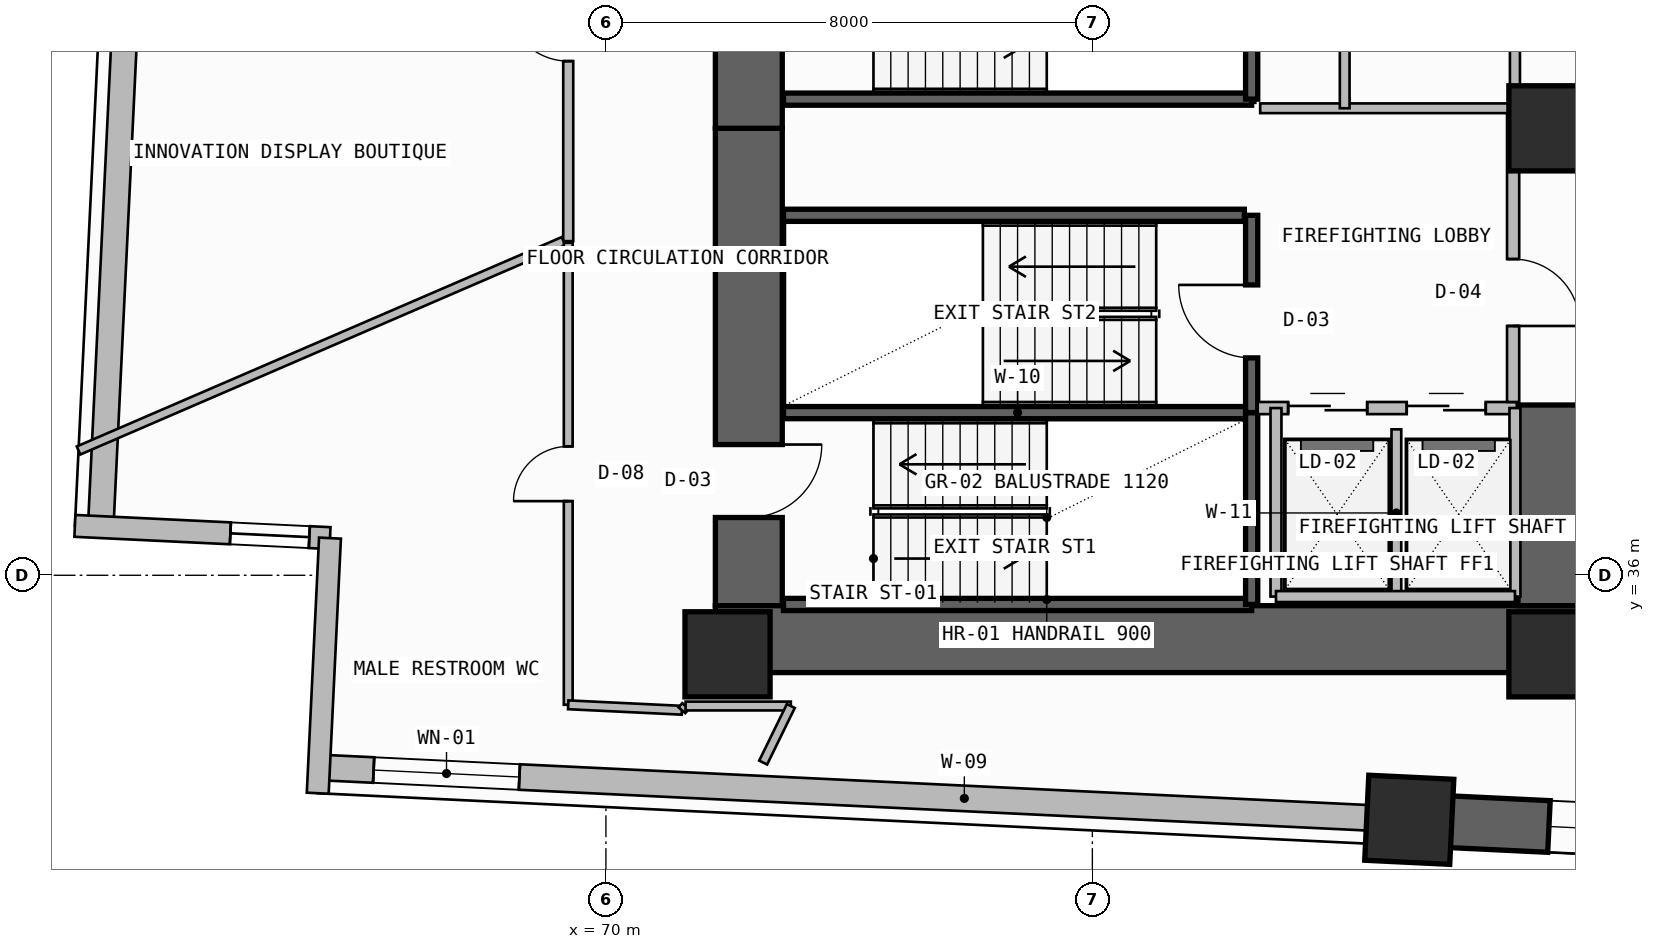
"""IFC4 building model, lengths in metres.
Left out: names, types, materials, properties, quantities, classifications, styles, units other than length and angle.
Written with IfcOpenShell. Run it as: python <this file> out.ifc"""

import sys

from ifc_helpers import new_model, si_unit, direction, frame, frame_2d, origin, origin_2d, place, context, subcontext, project, spatial, rectangle, extrude, element, fill, save


model = new_model("IFC4")
c1 = context("Model", 3, precision=1e-05, world=origin(), true_north=direction((0.0, 1.0)))
c2 = subcontext(c1, "Body", "Model", "MODEL_VIEW")
j1 = project(units=[si_unit("LENGTHUNIT", "METRE"), si_unit("PLANEANGLEUNIT", "RADIAN")], contexts=[c1])
p1 = place(None, origin())
s1 = spatial("IfcSite", under=j1, at=p1, CompositionType="ELEMENT")
p2 = place(p1, origin())
s2 = spatial("IfcBuilding", under=s1, at=p2, CompositionType="ELEMENT")
p3 = place(p2, frame((0.0, 0.0, 41.1)))
s3 = spatial("IfcBuildingStorey", under=s2, at=p3, CompositionType="ELEMENT", Elevation=41.1)
p4 = place(p3, frame((72.35, 35.5, -0.2), z_axis=(0.0, 0.0, 1.0), x_axis=(0.0, 1.0, 0.0)))
e1 = element("IfcWall", 1, at=p4, inside=s3, PredefinedType="SHEAR", context=c2, shape_type="SweptSolid", body=[
    extrude(rectangle(XDim=7.85, YDim=1.1, at=frame_2d((3.925, 0.0))), origin(), (0.0, 0.0, 1.0), 3.6),
])
p5 = place(p4, frame((1.45, 0.0, 0.2)))
e2 = element("IfcOpeningElement", 2, at=p5, cuts=e1, PredefinedType="OPENING", context=c2, shape_type="SweptSolid", body=[
    extrude(rectangle(XDim=1.2, YDim=2.2, at=frame_2d((0.6, 1.1))), frame((0.0, 0.56, 0.0), z_axis=(0.0, -1.0, 0.0), x_axis=(1.0, 0.0, 0.0)), (0.0, 0.0, 1.0), 1.12),
])
p6 = place(p3, frame((71.8, 34.95, -0.2), z_axis=(0.0, 0.0, 1.0), x_axis=(1.0, 0.0, 0.0)))
e3 = element("IfcWall", 3, at=p6, inside=s3, PredefinedType="SHEAR", context=c2, shape_type="SweptSolid", body=[
    extrude(rectangle(XDim=14.3, YDim=1.1, at=frame_2d((7.15, 0.0))), origin(), (0.0, 0.0, 1.0), 3.6),
])
p7 = place(p3, frame((85.55, 35.5, -0.2), z_axis=(0.0, 0.0, 1.0), x_axis=(0.0, 1.0, 0.0)))
e4 = element("IfcWall", 4, at=p7, inside=s3, PredefinedType="SHEAR", context=c2, shape_type="SweptSolid", body=[
    extrude(rectangle(XDim=3.3, YDim=1.1, at=frame_2d((1.65, 0.0))), origin(), (0.0, 0.0, 1.0), 3.6),
])
p8 = place(p3, frame((72.35, 43.35, -0.2), z_axis=(0.0, 0.0, 1.0), x_axis=(0.0, 1.0, 0.0)))
e5 = element("IfcWall", 5, at=p8, inside=s3, PredefinedType="SHEAR", context=c2, shape_type="SweptSolid", body=[
    extrude(rectangle(XDim=12.7, YDim=1.1, at=frame_2d((6.35, 0.0))), origin(), (0.0, 0.0, 1.0), 3.6),
])
p9 = place(p8, frame((1.35, 0.0, 0.2)))
e6 = element("IfcOpeningElement", 6, at=p9, cuts=e5, PredefinedType="OPENING", context=c2, shape_type="SweptSolid", body=[
    extrude(rectangle(XDim=1.2, YDim=2.2, at=frame_2d((0.6, 1.1))), frame((0.0, 0.56, 0.0), z_axis=(0.0, -1.0, 0.0), x_axis=(1.0, 0.0, 0.0)), (0.0, 0.0, 1.0), 1.12),
])
for number, where, z_axis, x_axis in (
    (7, (72.0, 34.7, 0.0), (0.0, 0.0, 1.0), (1.0, 0.0, 0.0)),
    (8, (85.55, 34.7, 0.0), (0.0, 0.0, 1.0), (1.0, 0.0, 0.0)),
    (9, (85.55, 43.35, 0.0), (0.0, 0.0, 1.0), (1.0, 0.0, 0.0)),
    (10, (83.212, 31.979, 0.0), (0.0, 0.0, 1.0), (-0.999, 0.048, 0.0)),
):
    element("IfcColumn", number, at=place(p3, frame(where, z_axis=z_axis, x_axis=x_axis)), inside=s3, PredefinedType="COLUMN", context=c2, shape_type="SweptSolid", body=[
        extrude(rectangle(XDim=1.4, YDim=1.4, at=origin_2d()), origin(), (0.0, 0.0, 1.0), 3.6),
    ])
p10 = place(p3, frame((65.281, 32.841, 0.0), z_axis=(0.0, 0.0, 1.0), x_axis=(0.998848298084, -0.047979968897, 0.0)))
e11 = element("IfcWall", 11, at=p10, inside=s3, PredefinedType="SOLIDWALL", context=c2, shape_type="SweptSolid", body=[
    extrude(rectangle(XDim=17.952, YDim=0.42, at=frame_2d((8.976, 0.0))), origin(), (0.0, 0.0, 1.0), 2.385),
])
p11 = place(p10, frame((0.9, 0.0, 1.2)))
e12 = element("IfcOpeningElement", 12, at=p11, cuts=e11, PredefinedType="OPENING", context=c2, shape_type="SweptSolid", body=[
    extrude(rectangle(XDim=2.4, YDim=0.9, at=frame_2d((1.2, 0.45))), frame((0.0, 0.22, 0.0), z_axis=(0.0, -1.0, 0.0), x_axis=(1.0, 0.0, 0.0)), (0.0, 0.0, 1.0), 0.44),
])
p12 = place(p3, frame((83.212, 31.979, -0.2), z_axis=(0.0, 0.0, 1.0), x_axis=(0.998848235141, -0.047981279227, 0.0)))
e13 = element("IfcWall", 13, at=p12, inside=s3, PredefinedType="SHEAR", context=c2, shape_type="SweptSolid", body=[
    extrude(rectangle(XDim=27.456, YDim=0.85, at=frame_2d((13.728, 0.0))), origin(), (0.0, 0.0, 1.0), 3.6),
])
p13 = place(p12, frame((2.3, 0.0, 1.2)))
e14 = element("IfcOpeningElement", 14, at=p13, cuts=e13, PredefinedType="OPENING", context=c2, shape_type="SweptSolid", body=[
    extrude(rectangle(XDim=2.4, YDim=0.9, at=frame_2d((1.2, 0.45))), frame((0.0, 0.435, 0.0), z_axis=(0.0, -1.0, 0.0), x_axis=(1.0, 0.0, 0.0)), (0.0, 0.0, 1.0), 0.87),
])
p14 = place(p3, frame((62.378, 51.09, 0.0), z_axis=(0.0, 0.0, 1.0), x_axis=(-0.047978424452, -0.99884837227, 0.0)))
e15 = element("IfcWall", 15, at=p14, inside=s3, PredefinedType="SOLIDWALL", context=c2, shape_type="SweptSolid", body=[
    extrude(rectangle(XDim=14.314, YDim=0.42, at=frame_2d((7.157, 0.0))), origin(), (0.0, 0.0, 1.0), 2.385),
])
p15 = place(p14, frame((2.3, 0.0, 1.2)))
e16 = element("IfcOpeningElement", 16, at=p15, cuts=e15, PredefinedType="OPENING", context=c2, shape_type="SweptSolid", body=[
    extrude(rectangle(XDim=2.4, YDim=0.9, at=frame_2d((1.2, 0.45))), frame((0.0, 0.22, 0.0), z_axis=(0.0, -1.0, 0.0), x_axis=(1.0, 0.0, 0.0)), (0.0, 0.0, 1.0), 0.44),
])
p16 = place(p3, frame((61.267, 36.812, 0.0), z_axis=(0.0, 0.0, 1.0), x_axis=(0.998849519138, -0.047954542207, 0.0)))
e17 = element("IfcWall", 17, at=p16, inside=s3, PredefinedType="SOLIDWALL", context=c2, shape_type="SweptSolid", body=[
    extrude(rectangle(XDim=4.2, YDim=0.36, at=frame_2d((2.1, 0.0))), origin(), (0.0, 0.0, 1.0), 3.4),
])
p17 = place(p16, frame((2.56, 0.0, 0.45)))
e18 = element("IfcOpeningElement", 18, at=p17, cuts=e17, PredefinedType="OPENING", context=c2, shape_type="SweptSolid", body=[
    extrude(rectangle(XDim=1.3, YDim=2.4, at=frame_2d((0.65, 1.2))), frame((0.0, 0.19, 0.0), z_axis=(0.0, -1.0, 0.0), x_axis=(1.0, 0.0, 0.0)), (0.0, 0.0, 1.0), 0.38),
])
p18 = place(p3, frame((65.462, 36.611, 0.0), z_axis=(0.0, 0.0, 1.0), x_axis=(-0.048015322758, -0.998846599224, 0.0)))
e19 = element("IfcWall", 19, at=p18, inside=s3, PredefinedType="SOLIDWALL", context=c2, shape_type="SweptSolid", body=[
    extrude(rectangle(XDim=4.2, YDim=0.36, at=frame_2d((2.1, 0.0))), origin(), (0.0, 0.0, 1.0), 3.4),
])
for number, where, z_axis, x_axis in (
    (20, (72.92, 35.52, -0.2), (0.0, 0.0, 1.0), (1.0, 0.0, 0.0)),
    (21, (72.92, 38.675, -0.2), (0.0, 0.0, 1.0), (1.0, 0.0, 0.0)),
):
    element("IfcWall", number, at=place(p3, frame(where, z_axis=z_axis, x_axis=x_axis)), inside=s3, PredefinedType="SOLIDWALL", context=c2, shape_type="SweptSolid", body=[
        extrude(rectangle(XDim=7.7, YDim=0.2, at=frame_2d((3.85, 0.0))), origin(), (0.0, 0.0, 1.0), 3.6),
    ])
p19 = place(p3, frame((80.62, 35.52, -0.2), z_axis=(0.0, 0.0, 1.0), x_axis=(0.0, 1.0, 0.0)))
e22 = element("IfcWall", 22, at=p19, inside=s3, PredefinedType="SOLIDWALL", context=c2, shape_type="SweptSolid", body=[
    extrude(rectangle(XDim=3.155, YDim=0.2, at=frame_2d((1.578, 0.0))), origin(), (0.0, 0.0, 1.0), 3.6),
])
p20 = place(p3, frame((80.62, 38.675, -0.2), z_axis=(0.0, 0.0, 1.0), x_axis=(0.0, 1.0, 0.0)))
e23 = element("IfcWall", 23, at=p20, inside=s3, PredefinedType="SOLIDWALL", context=c2, shape_type="SweptSolid", body=[
    extrude(rectangle(XDim=3.245, YDim=0.2, at=frame_2d((1.623, 0.0))), origin(), (0.0, 0.0, 1.0), 3.6),
])
p21 = place(p20, frame((0.9, 0.0, 0.2)))
e24 = element("IfcOpeningElement", 24, at=p21, cuts=e23, PredefinedType="OPENING", context=c2, shape_type="SweptSolid", body=[
    extrude(rectangle(XDim=1.2, YDim=2.2, at=frame_2d((0.6, 1.1))), frame((0.0, 0.11, 0.0), z_axis=(0.0, -1.0, 0.0), x_axis=(1.0, 0.0, 0.0)), (0.0, 0.0, 1.0), 0.22),
])
p22 = place(p3, frame((80.72, 38.75, 0.0), z_axis=(0.0, 0.0, 1.0), x_axis=(1.0, 0.0, 0.0)))
e25 = element("IfcWall", 25, at=p22, inside=s3, PredefinedType="SOLIDWALL", context=c2, shape_type="SweptSolid", body=[
    extrude(rectangle(XDim=4.26, YDim=0.2, at=frame_2d((2.13, 0.0))), origin(), (0.0, 0.0, 1.0), 3.4),
])
p23 = place(p22, frame((0.5, 0.0, 0.0)))
e26 = element("IfcOpeningElement", 26, at=p23, cuts=e25, PredefinedType="OPENING", context=c2, shape_type="SweptSolid", body=[
    extrude(rectangle(XDim=1.3, YDim=2.3, at=frame_2d((0.65, 1.15))), frame((0.0, 0.11, 0.0), z_axis=(0.0, -1.0, 0.0), x_axis=(1.0, 0.0, 0.0)), (0.0, 0.0, 1.0), 0.22),
])
p24 = place(p22, frame((2.45, 0.0, 0.0)))
e27 = element("IfcOpeningElement", 27, at=p24, cuts=e25, PredefinedType="OPENING", context=c2, shape_type="SweptSolid", body=[
    extrude(rectangle(XDim=1.3, YDim=2.3, at=frame_2d((0.65, 1.15))), frame((0.0, 0.11, 0.0), z_axis=(0.0, -1.0, 0.0), x_axis=(1.0, 0.0, 0.0)), (0.0, 0.0, 1.0), 0.22),
])
p25 = place(p3, frame((83.0, 35.65, 0.0), z_axis=(0.0, 0.0, 1.0), x_axis=(0.0, 1.0, 0.0)))
e28 = element("IfcWall", 28, at=p25, inside=s3, PredefinedType="PLUMBINGWALL", context=c2, shape_type="SweptSolid", body=[
    extrude(rectangle(XDim=2.75, YDim=0.16, at=frame_2d((1.375, 0.0))), origin(), (0.0, 0.0, 1.0), 3.4),
])
for number, where, z_axis, x_axis in (
    (29, (84.95, 35.65, 0.0), (0.0, 0.0, 1.0), (0.0, 1.0, 0.0)),
    (30, (81.02, 35.65, 0.0), (0.0, 0.0, 1.0), (0.0, 1.0, 0.0)),
):
    element("IfcWall", number, at=place(p3, frame(where, z_axis=z_axis, x_axis=x_axis)), inside=s3, PredefinedType="SOLIDWALL", context=c2, shape_type="SweptSolid", body=[
        extrude(rectangle(XDim=3.1, YDim=0.18, at=frame_2d((1.55, 0.0))), origin(), (0.0, 0.0, 1.0), 3.4),
    ])
p26 = place(p3, frame((81.02, 35.65, 0.0), z_axis=(0.0, 0.0, 1.0), x_axis=(1.0, 0.0, 0.0)))
e31 = element("IfcWall", 31, at=p26, inside=s3, PredefinedType="SOLIDWALL", context=c2, shape_type="SweptSolid", body=[
    extrude(rectangle(XDim=3.93, YDim=0.18, at=frame_2d((1.965, 0.0))), origin(), (0.0, 0.0, 1.0), 3.4),
])
p27 = place(p3, frame((84.92, 38.85, 0.0), z_axis=(0.0, 0.0, 1.0), x_axis=(0.0, 1.0, 0.0)))
e32 = element("IfcWall", 32, at=p27, inside=s3, PredefinedType="SOLIDWALL", context=c2, shape_type="SweptSolid", body=[
    extrude(rectangle(XDim=4.83, YDim=0.2, at=frame_2d((2.415, 0.0))), origin(), (0.0, 0.0, 1.0), 3.4),
])
p28 = place(p27, frame((1.25, 0.0, 0.0)))
e33 = element("IfcOpeningElement", 33, at=p28, cuts=e32, PredefinedType="OPENING", context=c2, shape_type="SweptSolid", body=[
    extrude(rectangle(XDim=1.1, YDim=2.2, at=frame_2d((0.55, 1.1))), frame((0.0, 0.11, 0.0), z_axis=(0.0, -1.0, 0.0), x_axis=(1.0, 0.0, 0.0)), (0.0, 0.0, 1.0), 0.22),
])
p29 = place(p3, frame((72.92, 41.92, -0.2), z_axis=(0.0, 0.0, 1.0), x_axis=(1.0, 0.0, 0.0)))
e34 = element("IfcWall", 34, at=p29, inside=s3, PredefinedType="SOLIDWALL", context=c2, shape_type="SweptSolid", body=[
    extrude(rectangle(XDim=7.58, YDim=0.2, at=frame_2d((3.79, 0.0))), origin(), (0.0, 0.0, 1.0), 3.6),
])
p30 = place(p3, frame((72.92, 43.83, -0.2), z_axis=(0.0, 0.0, 1.0), x_axis=(1.0, 0.0, 0.0)))
e35 = element("IfcWall", 35, at=p30, inside=s3, PredefinedType="SOLIDWALL", context=c2, shape_type="SweptSolid", body=[
    extrude(rectangle(XDim=7.7, YDim=0.2, at=frame_2d((3.85, 0.0))), origin(), (0.0, 0.0, 1.0), 3.6),
])
p31 = place(p3, frame((80.62, 43.83, -0.2), z_axis=(0.0, 0.0, 1.0), x_axis=(0.0, 1.0, 0.0)))
e36 = element("IfcWall", 36, at=p31, inside=s3, PredefinedType="SOLIDWALL", context=c2, shape_type="SweptSolid", body=[
    extrude(rectangle(XDim=3.24, YDim=0.2, at=frame_2d((1.62, 0.0))), origin(), (0.0, 0.0, 1.0), 3.6),
])
p32 = place(p3, frame((84.95, 43.68, 0.0), z_axis=(0.0, 0.0, 1.0), x_axis=(0.0, 1.0, 0.0)))
e37 = element("IfcWall", 37, at=p32, inside=s3, PredefinedType="PLUMBINGWALL", context=c2, shape_type="SweptSolid", body=[
    extrude(rectangle(XDim=1.9, YDim=0.165, at=frame_2d((0.95, 0.0))), origin(), (0.0, 0.0, 1.0), 3.4),
])
p33 = place(p3, frame((80.76, 43.68, 0.0), z_axis=(0.0, 0.0, 1.0), x_axis=(1.0, 0.0, 0.0)))
e38 = element("IfcWall", 38, at=p33, inside=s3, PredefinedType="PLUMBINGWALL", context=c2, shape_type="SweptSolid", body=[
    extrude(rectangle(XDim=4.19, YDim=0.16, at=frame_2d((2.095, 0.0))), origin(), (0.0, 0.0, 1.0), 3.4),
])
p34 = place(p3, frame((82.15, 43.68, 0.0), z_axis=(0.0, 0.0, 1.0), x_axis=(0.0, 1.0, 0.0)))
e39 = element("IfcWall", 39, at=p34, inside=s3, PredefinedType="PLUMBINGWALL", context=c2, shape_type="SweptSolid", body=[
    extrude(rectangle(XDim=1.9, YDim=0.16, at=frame_2d((0.95, 0.0))), origin(), (0.0, 0.0, 1.0), 3.4),
])
p35 = place(p3, frame((69.38, 48.416, 0.0), z_axis=(0.0, 0.0, 1.0), x_axis=(0.0, -1.0, 0.0)))
e40 = element("IfcWall", 40, at=p35, inside=s3, PredefinedType="PARTITIONING", context=c2, shape_type="SweptSolid", body=[
    extrude(rectangle(XDim=6.921, YDim=0.165, at=frame_2d((3.46, 0.0))), origin(), (0.0, 0.0, 1.0), 3.4),
])
p36 = place(p35, frame((2.961, 0.0, 0.0)))
e41 = element("IfcOpeningElement", 41, at=p36, cuts=e40, PredefinedType="OPENING", context=c2, shape_type="SweptSolid", body=[
    extrude(rectangle(XDim=1.0, YDim=2.2, at=frame_2d((0.5, 1.1))), frame((0.0, 0.093, 0.0), z_axis=(0.0, -1.0, 0.0), x_axis=(1.0, 0.0, 0.0)), (0.0, 0.0, 1.0), 0.185),
])
p37 = place(p3, frame((69.302, 41.495, 0.0), z_axis=(0.0, 0.0, 1.0), x_axis=(-0.918109770602, -0.396326190309, 0.0)))
e42 = element("IfcWall", 42, at=p37, inside=s3, PredefinedType="PARTITIONING", context=c2, shape_type="SweptSolid", body=[
    extrude(rectangle(XDim=8.687, YDim=0.145, at=frame_2d((4.344, 0.0))), origin(), (0.0, 0.0, 1.0), 3.4),
])
p38 = place(p3, frame((69.38, 41.469, 0.0), z_axis=(0.0, 0.0, 1.0), x_axis=(0.0, -1.0, 0.0)))
e43 = element("IfcWall", 43, at=p38, inside=s3, PredefinedType="PARTITIONING", context=c2, shape_type="SweptSolid", body=[
    extrude(rectangle(XDim=7.599, YDim=0.145, at=frame_2d((3.799, 0.0))), origin(), (0.0, 0.0, 1.0), 3.4),
])
p39 = place(p38, frame((3.349, 0.0, 0.0)))
e44 = element("IfcOpeningElement", 44, at=p39, cuts=e43, PredefinedType="OPENING", context=c2, shape_type="SweptSolid", body=[
    extrude(rectangle(XDim=0.9, YDim=2.1, at=frame_2d((0.45, 1.05))), frame((0.0, 0.083, 0.0), z_axis=(0.0, -1.0, 0.0), x_axis=(1.0, 0.0, 0.0)), (0.0, 0.0, 1.0), 0.165),
])
p40 = place(p3, frame((69.38, 33.87, 0.0), z_axis=(0.0, 0.0, 1.0), x_axis=(0.998847987666, -0.047986430739, 0.0)))
e45 = element("IfcWall", 45, at=p40, inside=s3, PredefinedType="PARTITIONING", context=c2, shape_type="SweptSolid", body=[
    extrude(rectangle(XDim=1.872, YDim=0.145, at=frame_2d((0.936, 0.0))), origin(), (0.0, 0.0, 1.0), 3.4),
])
p41 = place(p3, frame((71.25, 33.78, 0.0), z_axis=(0.0, 0.0, 1.0), x_axis=(0.652100218984, 0.758132774916, 0.0)))
e46 = element("IfcWall", 46, at=p41, inside=s3, PredefinedType="PARTITIONING", context=c2, shape_type="SweptSolid", body=[
    extrude(rectangle(XDim=0.092, YDim=0.145, at=frame_2d((0.046, 0.0))), origin(), (0.0, 0.0, 1.0), 3.4),
])
p42 = place(p3, frame((71.31, 33.85, 0.0), z_axis=(0.0, 0.0, 1.0), x_axis=(1.0, 0.0, 0.0)))
e47 = element("IfcWall", 47, at=p42, inside=s3, PredefinedType="PARTITIONING", context=c2, shape_type="SweptSolid", body=[
    extrude(rectangle(XDim=1.731, YDim=0.145, at=frame_2d((0.865, 0.0))), origin(), (0.0, 0.0, 1.0), 3.4),
])
p43 = place(p3, frame((73.041, 33.85, 0.0), z_axis=(0.0, 0.0, 1.0), x_axis=(-0.439366630187, -0.898307833807, 0.0)))
e48 = element("IfcWall", 48, at=p43, inside=s3, PredefinedType="PARTITIONING", context=c2, shape_type="SweptSolid", body=[
    extrude(rectangle(XDim=1.035, YDim=0.145, at=frame_2d((0.518, 0.0))), origin(), (0.0, 0.0, 1.0), 3.4),
])
p44 = place(p11, origin())
e49 = element("IfcWindow", 49, at=p44, inside=s3, PartitioningType="SINGLE_PANEL", PredefinedType="WINDOW", context=c2, shape_type="SweptSolid", body=[
    extrude(rectangle(XDim=2.4, YDim=0.9, at=frame_2d((1.2, 0.45))), frame((0.0, 0.03, 0.0), z_axis=(0.0, -1.0, 0.0), x_axis=(1.0, 0.0, 0.0)), (0.0, 0.0, 1.0), 0.06),
])
fill(e12, e49)
p45 = place(p13, origin())
e50 = element("IfcWindow", 50, at=p45, inside=s3, PartitioningType="SINGLE_PANEL", PredefinedType="WINDOW", context=c2, shape_type="SweptSolid", body=[
    extrude(rectangle(XDim=2.4, YDim=0.9, at=frame_2d((1.2, 0.45))), frame((0.0, 0.03, 0.0), z_axis=(0.0, -1.0, 0.0), x_axis=(1.0, 0.0, 0.0)), (0.0, 0.0, 1.0), 0.06),
])
fill(e14, e50)
p46 = place(p17, origin())
e51 = element("IfcWindow", 51, at=p46, inside=s3, PartitioningType="SINGLE_PANEL", PredefinedType="WINDOW", context=c2, shape_type="SweptSolid", body=[
    extrude(rectangle(XDim=1.3, YDim=2.4, at=frame_2d((0.65, 1.2))), frame((0.0, 0.03, 0.0), z_axis=(0.0, -1.0, 0.0), x_axis=(1.0, 0.0, 0.0)), (0.0, 0.0, 1.0), 0.06),
])
fill(e18, e51)
p47 = place(p5, frame((1.2, 0.0, 0.0), z_axis=(0.0, 0.0, 1.0), x_axis=(-1.0, 0.0, 0.0)))
e52 = element("IfcDoor", 52, at=p47, inside=s3, OperationType="SINGLE_SWING_LEFT", PredefinedType="USERDEFINED", context=c2, shape_type="SweptSolid", body=[
    extrude(rectangle(XDim=1.2, YDim=2.2, at=frame_2d((0.6, 1.1))), frame((0.0, 0.025, 0.0), z_axis=(0.0, -1.0, 0.0), x_axis=(1.0, 0.0, 0.0)), (0.0, 0.0, 1.0), 0.05),
])
fill(e2, e52)
p48 = place(p21, origin())
e53 = element("IfcDoor", 53, at=p48, inside=s3, OperationType="SINGLE_SWING_RIGHT", PredefinedType="USERDEFINED", context=c2, shape_type="SweptSolid", body=[
    extrude(rectangle(XDim=1.2, YDim=2.2, at=frame_2d((0.6, 1.1))), frame((0.0, 0.025, 0.0), z_axis=(0.0, -1.0, 0.0), x_axis=(1.0, 0.0, 0.0)), (0.0, 0.0, 1.0), 0.05),
])
fill(e24, e53)
p49 = place(p23, origin())
e54 = element("IfcDoor", 54, at=p49, inside=s3, OperationType="DOUBLE_DOOR_SLIDING", PredefinedType="DOOR", context=c2, shape_type="SweptSolid", body=[
    extrude(rectangle(XDim=1.3, YDim=2.3, at=frame_2d((0.65, 1.15))), frame((0.0, 0.025, 0.0), z_axis=(0.0, -1.0, 0.0), x_axis=(1.0, 0.0, 0.0)), (0.0, 0.0, 1.0), 0.05),
])
fill(e26, e54)
p50 = place(p24, origin())
e55 = element("IfcDoor", 55, at=p50, inside=s3, OperationType="DOUBLE_DOOR_SLIDING", PredefinedType="DOOR", context=c2, shape_type="SweptSolid", body=[
    extrude(rectangle(XDim=1.3, YDim=2.3, at=frame_2d((0.65, 1.15))), frame((0.0, 0.025, 0.0), z_axis=(0.0, -1.0, 0.0), x_axis=(1.0, 0.0, 0.0)), (0.0, 0.0, 1.0), 0.05),
])
fill(e27, e55)
p51 = place(p28, frame((1.1, 0.0, 0.0), z_axis=(0.0, 0.0, 1.0), x_axis=(-1.0, 0.0, 0.0)))
e56 = element("IfcDoor", 56, at=p51, inside=s3, OperationType="SINGLE_SWING_RIGHT", PredefinedType="DOOR", context=c2, shape_type="SweptSolid", body=[
    extrude(rectangle(XDim=1.1, YDim=2.2, at=frame_2d((0.55, 1.1))), frame((0.0, 0.025, 0.0), z_axis=(0.0, -1.0, 0.0), x_axis=(1.0, 0.0, 0.0)), (0.0, 0.0, 1.0), 0.05),
])
fill(e33, e56)
p52 = place(p36, frame((1.0, 0.0, 0.0), z_axis=(0.0, 0.0, 1.0), x_axis=(-1.0, 0.0, 0.0)))
e57 = element("IfcDoor", 57, at=p52, inside=s3, OperationType="SINGLE_SWING_RIGHT", PredefinedType="DOOR", context=c2, shape_type="SweptSolid", body=[
    extrude(rectangle(XDim=1.0, YDim=2.2, at=frame_2d((0.5, 1.1))), frame((0.0, 0.025, 0.0), z_axis=(0.0, -1.0, 0.0), x_axis=(1.0, 0.0, 0.0)), (0.0, 0.0, 1.0), 0.05),
])
fill(e41, e57)
p53 = place(p39, frame((0.9, 0.0, 0.0), z_axis=(0.0, 0.0, 1.0), x_axis=(-1.0, 0.0, 0.0)))
e58 = element("IfcDoor", 58, at=p53, inside=s3, OperationType="SINGLE_SWING_LEFT", PredefinedType="DOOR", context=c2, shape_type="SweptSolid", body=[
    extrude(rectangle(XDim=0.9, YDim=2.1, at=frame_2d((0.45, 1.05))), frame((0.0, 0.025, 0.0), z_axis=(0.0, -1.0, 0.0), x_axis=(1.0, 0.0, 0.0)), (0.0, 0.0, 1.0), 0.05),
])
fill(e44, e58)
save(model, sys.argv[1])
